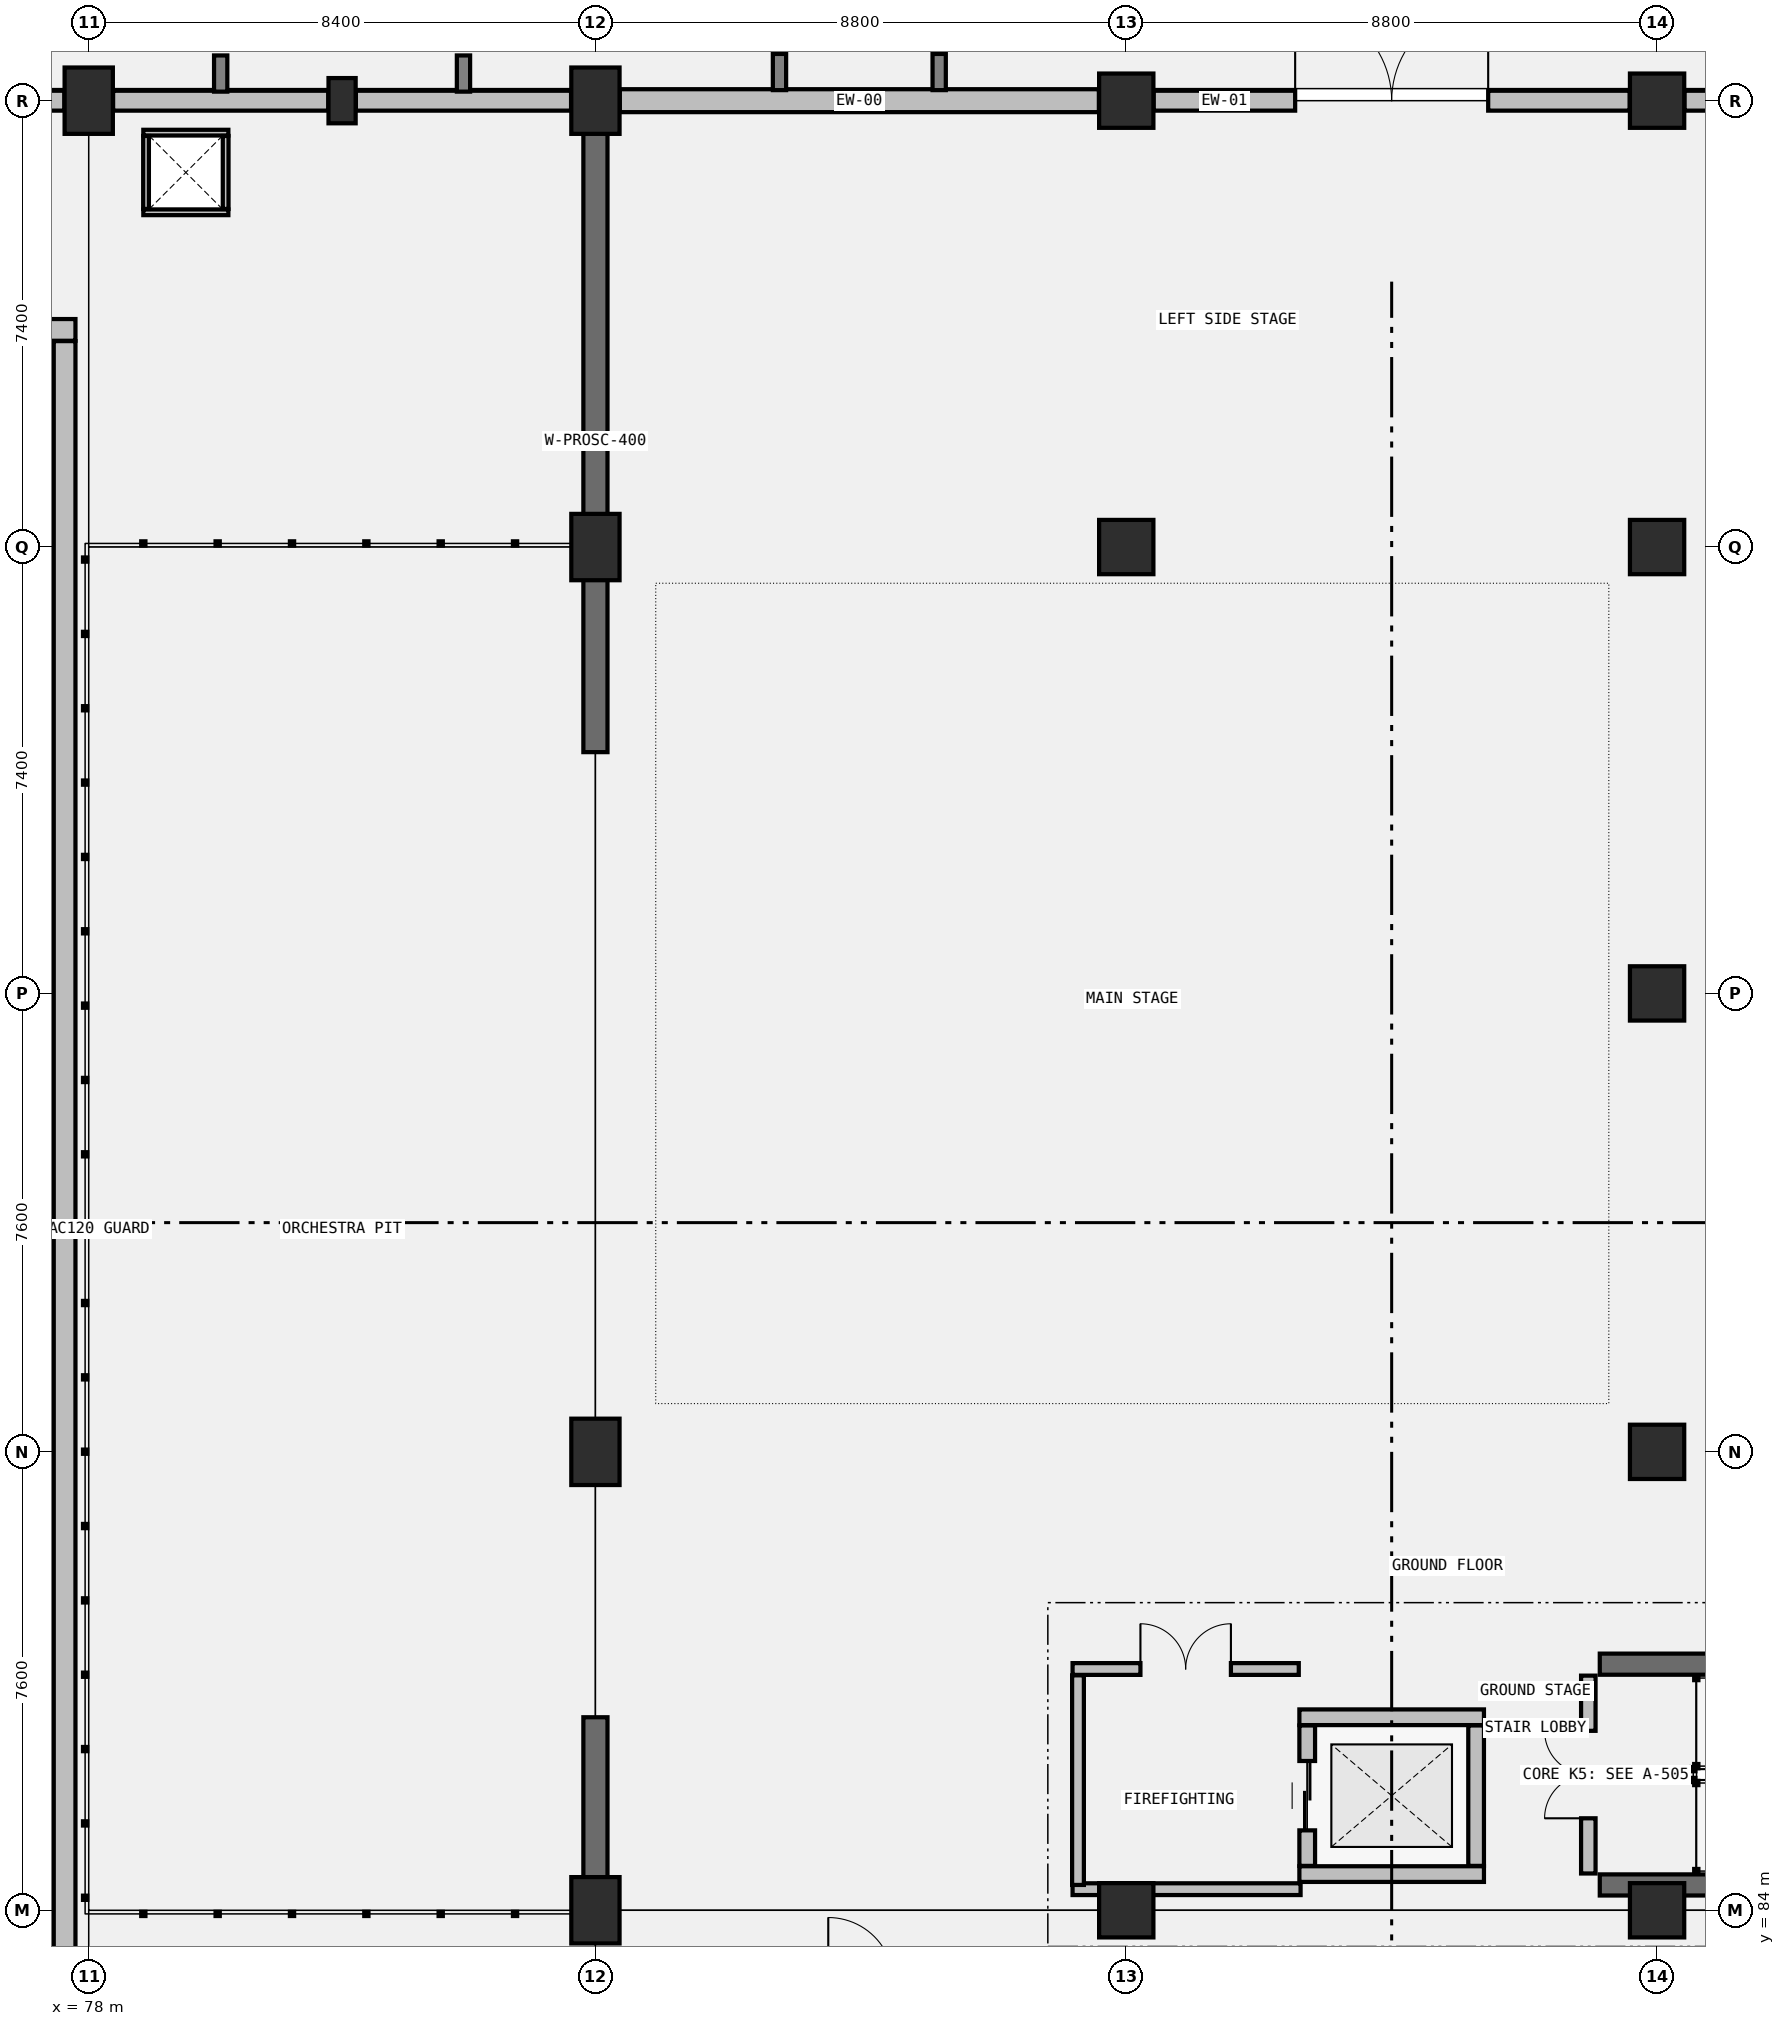
"""IFC4 building model, lengths in metres.
Left out: names, types, materials, properties, quantities, classifications, styles, units other than length and angle.
Written with IfcOpenShell. Run it as: python <this file> out.ifc"""

import sys

from ifc_helpers import new_model, si_unit, direction, frame, frame_2d, origin, origin_2d, place, context, subcontext, project, spatial, rectangle, extrude, element, fill, save


model = new_model("IFC4")
c1 = context("Model", 3, precision=1e-05, world=origin(), true_north=direction((0.0, 1.0)))
c2 = subcontext(c1, "Body", "Model", "MODEL_VIEW")
j1 = project(units=[si_unit("LENGTHUNIT", "METRE"), si_unit("PLANEANGLEUNIT", "RADIAN")], contexts=[c1])
p1 = place(None, origin())
s1 = spatial("IfcSite", under=j1, at=p1, CompositionType="ELEMENT")
p2 = place(p1, origin())
s2 = spatial("IfcBuilding", under=s1, at=p2, CompositionType="ELEMENT")
p3 = place(p2, origin())
s3 = spatial("IfcBuildingStorey", under=s2, at=p3, CompositionType="ELEMENT", Elevation=0.0)
p4 = place(p3, frame((78.0, 114.0, 0.0), z_axis=(0.0, 0.0, 1.0), x_axis=(1.0, 0.0, 0.0)))
e1 = element("IfcColumn", 1, at=p4, inside=s3, PredefinedType="COLUMN", context=c2, shape_type="SweptSolid", body=[
    extrude(rectangle(XDim=0.8, YDim=1.1, at=origin_2d()), origin(), (0.0, 0.0, 1.0), 5.4),
])
p5 = place(p3, frame((82.2, 114.0, 0.0), z_axis=(0.0, 0.0, 1.0), x_axis=(1.0, 0.0, 0.0)))
e2 = element("IfcColumn", 2, at=p5, inside=s3, PredefinedType="PILASTER", context=c2, shape_type="SweptSolid", body=[
    extrude(rectangle(XDim=0.45, YDim=0.75, at=origin_2d()), origin(), (0.0, 0.0, 1.0), 5.4),
])
for number, where, z_axis, x_axis in (
    (3, (86.4, 84.0, 0.0), (0.0, 0.0, 1.0), (1.0, 0.0, 0.0)),
    (4, (86.4, 91.6, 0.0), (0.0, 0.0, 1.0), (1.0, 0.0, 0.0)),
    (5, (86.4, 106.6, 0.0), (0.0, 0.0, 1.0), (1.0, 0.0, 0.0)),
    (6, (86.4, 114.0, 0.0), (0.0, 0.0, 1.0), (1.0, 0.0, 0.0)),
):
    element("IfcColumn", number, at=place(p3, frame(where, z_axis=z_axis, x_axis=x_axis)), inside=s3, PredefinedType="COLUMN", context=c2, shape_type="SweptSolid", body=[
        extrude(rectangle(XDim=0.8, YDim=1.1, at=origin_2d()), origin(), (0.0, 0.0, 1.0), 5.4),
    ])
for number, where, z_axis, x_axis in (
    (7, (95.2, 84.0, 0.0), (0.0, 0.0, 1.0), (1.0, 0.0, 0.0)),
    (8, (95.2, 106.6, 0.0), (0.0, 0.0, 1.0), (1.0, 0.0, 0.0)),
    (9, (95.2, 114.0, 0.0), (0.0, 0.0, 1.0), (1.0, 0.0, 0.0)),
    (10, (104.0, 84.0, 0.0), (0.0, 0.0, 1.0), (1.0, 0.0, 0.0)),
    (11, (104.0, 91.6, 0.0), (0.0, 0.0, 1.0), (1.0, 0.0, 0.0)),
    (12, (104.0, 99.2, 0.0), (0.0, 0.0, 1.0), (1.0, 0.0, 0.0)),
    (13, (104.0, 106.6, 0.0), (0.0, 0.0, 1.0), (1.0, 0.0, 0.0)),
    (14, (104.0, 114.0, 0.0), (0.0, 0.0, 1.0), (1.0, 0.0, 0.0)),
):
    element("IfcColumn", number, at=place(p3, frame(where, z_axis=z_axis, x_axis=x_axis)), inside=s3, PredefinedType="COLUMN", context=c2, shape_type="SweptSolid", body=[
        extrude(rectangle(XDim=0.9, YDim=0.9, at=origin_2d()), origin(), (0.0, 0.0, 1.0), 5.4),
    ])
p6 = place(p3, frame((86.4, 84.5, 0.0), z_axis=(0.0, 0.0, 1.0), x_axis=(0.0, 1.0, 0.0)))
e15 = element("IfcWall", 15, at=p6, inside=s3, PredefinedType="SHEAR", context=c2, shape_type="SweptSolid", body=[
    extrude(rectangle(XDim=2.7, YDim=0.4, at=frame_2d((1.35, 0.0))), origin(), (0.0, 0.0, 1.0), 5.16),
])
p7 = place(p3, frame((86.4, 103.2, 0.0), z_axis=(0.0, 0.0, 1.0), x_axis=(0.0, 1.0, 0.0)))
e16 = element("IfcWall", 16, at=p7, inside=s3, PredefinedType="SHEAR", context=c2, shape_type="SweptSolid", body=[
    extrude(rectangle(XDim=10.3, YDim=0.4, at=frame_2d((5.15, 0.0))), origin(), (0.0, 0.0, 1.0), 5.16),
])
for number, where, z_axis, x_axis in (
    (17, (103.05, 84.42, 0.0), (0.0, 0.0, 1.0), (1.0, 0.0, 0.0)),
    (18, (111.2, 88.08, 0.0), (0.0, 0.0, 1.0), (-1.0, 0.0, 0.0)),
):
    element("IfcWall", number, at=place(p3, frame(where, z_axis=z_axis, x_axis=x_axis)), inside=s3, PredefinedType="SHEAR", context=c2, shape_type="SweptSolid", body=[
        extrude(rectangle(XDim=8.15, YDim=0.35, at=frame_2d((4.075, 0.0))), origin(), (0.0, 0.0, 1.0), 5.16),
    ])
for number, where, z_axis, x_axis in (
    (19, (74.029, 114.0, 0.0), (0.0, 0.0, 1.0), (1.0, 0.0, 0.0)),
    (20, (78.404, 114.0, 0.0), (0.0, 0.0, 1.0), (1.0, 0.0, 0.0)),
):
    element("IfcWall", number, at=place(p3, frame(where, z_axis=z_axis, x_axis=x_axis)), inside=s3, PredefinedType="STANDARD", context=c2, shape_type="SweptSolid", body=[
        extrude(rectangle(XDim=3.567, YDim=0.33, at=frame_2d((1.783, 0.0))), origin(), (0.0, 0.0, 1.0), 4.428),
    ])
p8 = place(p3, frame((82.429, 114.0, 0.0), z_axis=(0.0, 0.0, 1.0), x_axis=(1.0, 0.0, 0.0)))
e21 = element("IfcWall", 21, at=p8, inside=s3, PredefinedType="STANDARD", context=c2, shape_type="SweptSolid", body=[
    extrude(rectangle(XDim=3.567, YDim=0.33, at=frame_2d((1.784, 0.0))), origin(), (0.0, 0.0, 1.0), 4.428),
])
p9 = place(p3, frame((86.804, 114.0, 0.0), z_axis=(0.0, 0.0, 1.0), x_axis=(1.0, 0.0, 0.0)))
e22 = element("IfcWall", 22, at=p9, inside=s3, PredefinedType="STANDARD", context=c2, shape_type="SweptSolid", body=[
    extrude(rectangle(XDim=7.942, YDim=0.38, at=frame_2d((3.971, 0.0))), origin(), (0.0, 0.0, 1.0), 4.328),
])
p10 = place(p3, frame((95.654, 114.0, 0.0), z_axis=(0.0, 0.0, 1.0), x_axis=(1.0, 0.0, 0.0)))
e23 = element("IfcWall", 23, at=p10, inside=s3, PredefinedType="STANDARD", context=c2, shape_type="SweptSolid", body=[
    extrude(rectangle(XDim=7.892, YDim=0.33, at=frame_2d((3.946, 0.0))), origin(), (0.0, 0.0, 1.0), 4.338),
])
p11 = place(p10, frame((2.346, 0.0, 0.0)))
e24 = element("IfcOpeningElement", 24, at=p11, cuts=e23, PredefinedType="OPENING", context=c2, shape_type="SweptSolid", body=[
    extrude(rectangle(XDim=3.2, YDim=3.2, at=frame_2d((1.6, 1.6))), frame((0.0, 0.175, 0.0), z_axis=(0.0, -1.0, 0.0), x_axis=(1.0, 0.0, 0.0)), (0.0, 0.0, 1.0), 0.35),
])
p12 = place(p3, frame((104.454, 114.0, 0.0), z_axis=(0.0, 0.0, 1.0), x_axis=(1.0, 0.0, 0.0)))
e25 = element("IfcWall", 25, at=p12, inside=s3, PredefinedType="STANDARD", context=c2, shape_type="SweptSolid", body=[
    extrude(rectangle(XDim=7.492, YDim=0.33, at=frame_2d((3.746, 0.0))), origin(), (0.0, 0.0, 1.0), 4.338),
])
for number, where, z_axis, x_axis in (
    (26, (78.905, 112.15, 0.0), (0.0, 0.0, 1.0), (1.0, 0.0, 0.0)),
    (27, (78.905, 113.47, 0.0), (0.0, 0.0, 1.0), (1.0, 0.0, 0.0)),
):
    element("IfcWall", number, at=place(p3, frame(where, z_axis=z_axis, x_axis=x_axis)), inside=s3, PredefinedType="PARTITIONING", context=c2, shape_type="SweptSolid", body=[
        extrude(rectangle(XDim=1.41, YDim=0.095, at=frame_2d((0.705, 0.0))), origin(), (0.0, 0.0, 1.0), 5.16),
    ])
for number, where, z_axis, x_axis in (
    (28, (78.95, 112.205, 0.0), (0.0, 0.0, 1.0), (0.0, 1.0, 0.0)),
    (29, (80.27, 112.205, 0.0), (0.0, 0.0, 1.0), (0.0, 1.0, 0.0)),
):
    element("IfcWall", number, at=place(p3, frame(where, z_axis=z_axis, x_axis=x_axis)), inside=s3, PredefinedType="PARTITIONING", context=c2, shape_type="SweptSolid", body=[
        extrude(rectangle(XDim=1.21, YDim=0.095, at=frame_2d((0.605, 0.0))), origin(), (0.0, 0.0, 1.0), 5.16),
    ])
p13 = place(p3, frame((102.86, 84.61, 0.0), z_axis=(0.0, 0.0, 1.0), x_axis=(0.0, 1.0, 0.0)))
e30 = element("IfcWall", 30, at=p13, inside=s3, PredefinedType="STANDARD", context=c2, shape_type="SweptSolid", body=[
    extrude(rectangle(XDim=3.28, YDim=0.24, at=frame_2d((1.64, 0.0))), origin(), (0.0, 0.0, 1.0), 5.16),
])
p14 = place(p13, frame((0.915, 0.0, 0.0)))
e31 = element("IfcOpeningElement", 31, at=p14, cuts=e30, PredefinedType="OPENING", context=c2, shape_type="SweptSolid", body=[
    extrude(rectangle(XDim=1.45, YDim=2.2, at=frame_2d((0.725, 1.1))), frame((0.0, 0.13, 0.0), z_axis=(0.0, -1.0, 0.0), x_axis=(1.0, 0.0, 0.0)), (0.0, 0.0, 1.0), 0.26),
])
for number, where, z_axis, x_axis in (
    (32, (98.07, 84.6, 0.0), (0.0, 0.0, 1.0), (1.0, 0.0, 0.0)),
    (33, (98.07, 87.2, 0.0), (0.0, 0.0, 1.0), (1.0, 0.0, 0.0)),
):
    element("IfcWall", number, at=place(p3, frame(where, z_axis=z_axis, x_axis=x_axis)), inside=s3, PredefinedType="STANDARD", context=c2, shape_type="SweptSolid", body=[
        extrude(rectangle(XDim=3.06, YDim=0.26, at=frame_2d((1.53, 0.0))), origin(), (0.0, 0.0, 1.0), 5.16),
    ])
p15 = place(p3, frame((98.2, 84.736, 0.0), z_axis=(0.0, 0.0, 1.0), x_axis=(0.0, 1.0, 0.0)))
e34 = element("IfcWall", 34, at=p15, inside=s3, PredefinedType="STANDARD", context=c2, shape_type="SweptSolid", body=[
    extrude(rectangle(XDim=2.328, YDim=0.26, at=frame_2d((1.164, 0.0))), origin(), (0.0, 0.0, 1.0), 5.16),
])
p16 = place(p15, frame((0.589, 0.0, 0.0)))
e35 = element("IfcOpeningElement", 35, at=p16, cuts=e34, PredefinedType="OPENING", context=c2, shape_type="SweptSolid", body=[
    extrude(rectangle(XDim=1.15, YDim=2.15, at=frame_2d((0.575, 1.075))), frame((0.0, 0.14, 0.0), z_axis=(0.0, -1.0, 0.0), x_axis=(1.0, 0.0, 0.0)), (0.0, 0.0, 1.0), 0.28),
])
p17 = place(p3, frame((101.0, 84.736, 0.0), z_axis=(0.0, 0.0, 1.0), x_axis=(0.0, 1.0, 0.0)))
e36 = element("IfcWall", 36, at=p17, inside=s3, PredefinedType="STANDARD", context=c2, shape_type="SweptSolid", body=[
    extrude(rectangle(XDim=2.328, YDim=0.26, at=frame_2d((1.164, 0.0))), origin(), (0.0, 0.0, 1.0), 5.16),
])
p18 = place(p3, frame((94.31, 84.35, 0.0), z_axis=(0.0, 0.0, 1.0), x_axis=(1.0, 0.0, 0.0)))
e37 = element("IfcWall", 37, at=p18, inside=s3, PredefinedType="PARTITIONING", context=c2, shape_type="SweptSolid", body=[
    extrude(rectangle(XDim=3.78, YDim=0.195, at=frame_2d((1.89, 0.0))), origin(), (0.0, 0.0, 1.0), 5.16),
])
p19 = place(p3, frame((94.4, 84.42, 0.0), z_axis=(0.0, 0.0, 1.0), x_axis=(0.0, 1.0, 0.0)))
e38 = element("IfcWall", 38, at=p19, inside=s3, PredefinedType="PARTITIONING", context=c2, shape_type="SweptSolid", body=[
    extrude(rectangle(XDim=3.475, YDim=0.195, at=frame_2d((1.738, 0.0))), origin(), (0.0, 0.0, 1.0), 5.16),
])
p20 = place(p3, frame((94.31, 88.0, 0.0), z_axis=(0.0, 0.0, 1.0), x_axis=(1.0, 0.0, 0.0)))
e39 = element("IfcWall", 39, at=p20, inside=s3, PredefinedType="PARTITIONING", context=c2, shape_type="SweptSolid", body=[
    extrude(rectangle(XDim=3.75, YDim=0.195, at=frame_2d((1.875, 0.0))), origin(), (0.0, 0.0, 1.0), 5.16),
])
p21 = place(p20, frame((1.125, 0.0, 0.0)))
e40 = element("IfcOpeningElement", 40, at=p21, cuts=e39, PredefinedType="OPENING", context=c2, shape_type="SweptSolid", body=[
    extrude(rectangle(XDim=1.5, YDim=2.2, at=frame_2d((0.75, 1.1))), frame((0.0, 0.107, 0.0), z_axis=(0.0, -1.0, 0.0), x_axis=(1.0, 0.0, 0.0)), (0.0, 0.0, 1.0), 0.215),
])
p22 = place(p3, frame((65.78, 110.2, 0.0), z_axis=(0.0, 0.0, 1.0), x_axis=(1.0, 0.0, 0.0)))
e41 = element("IfcWall", 41, at=p22, inside=s3, PredefinedType="PARTITIONING", context=c2, shape_type="SweptSolid", body=[
    extrude(rectangle(XDim=12.0, YDim=0.36, at=frame_2d((6.0, 0.0))), origin(), (0.0, 0.0, 1.0), 5.16),
])
p23 = place(p3, frame((77.6, 79.986, 0.0), z_axis=(0.0, 0.0, 1.0), x_axis=(0.0, 1.0, 0.0)))
e42 = element("IfcWall", 42, at=p23, inside=s3, PredefinedType="PARTITIONING", context=c2, shape_type="SweptSolid", body=[
    extrude(rectangle(XDim=30.028, YDim=0.36, at=frame_2d((15.014, 0.0))), origin(), (0.0, 0.0, 1.0), 5.16),
])
p24 = place(p11, origin())
e43 = element("IfcDoor", 43, at=p24, inside=s3, OperationType="DOUBLE_DOOR_SINGLE_SWING", PredefinedType="GATE", context=c2, shape_type="SweptSolid", body=[
    extrude(rectangle(XDim=3.2, YDim=3.2, at=frame_2d((1.6, 1.6))), frame((0.0, 0.025, 0.0), z_axis=(0.0, -1.0, 0.0), x_axis=(1.0, 0.0, 0.0)), (0.0, 0.0, 1.0), 0.05),
])
fill(e24, e43)
p25 = place(p14, origin())
e44 = element("IfcDoor", 44, at=p25, inside=s3, OperationType="DOUBLE_DOOR_SINGLE_SWING", PredefinedType="DOOR", context=c2, shape_type="SweptSolid", body=[
    extrude(rectangle(XDim=1.45, YDim=2.2, at=frame_2d((0.725, 1.1))), frame((0.0, 0.025, 0.0), z_axis=(0.0, -1.0, 0.0), x_axis=(1.0, 0.0, 0.0)), (0.0, 0.0, 1.0), 0.05),
])
fill(e31, e44)
p26 = place(p16, origin())
e45 = element("IfcDoor", 45, at=p26, inside=s3, OperationType="SLIDING_TO_LEFT", PredefinedType="DOOR", context=c2, shape_type="SweptSolid", body=[
    extrude(rectangle(XDim=1.15, YDim=2.15, at=frame_2d((0.575, 1.075))), frame((0.0, 0.025, 0.0), z_axis=(0.0, -1.0, 0.0), x_axis=(1.0, 0.0, 0.0)), (0.0, 0.0, 1.0), 0.05),
])
fill(e35, e45)
p27 = place(p21, origin())
e46 = element("IfcDoor", 46, at=p27, inside=s3, OperationType="DOUBLE_DOOR_SINGLE_SWING", PredefinedType="DOOR", context=c2, shape_type="SweptSolid", body=[
    extrude(rectangle(XDim=1.5, YDim=2.2, at=frame_2d((0.75, 1.1))), frame((0.0, 0.025, 0.0), z_axis=(0.0, -1.0, 0.0), x_axis=(1.0, 0.0, 0.0)), (0.0, 0.0, 1.0), 0.05),
])
fill(e40, e46)
save(model, sys.argv[1])
